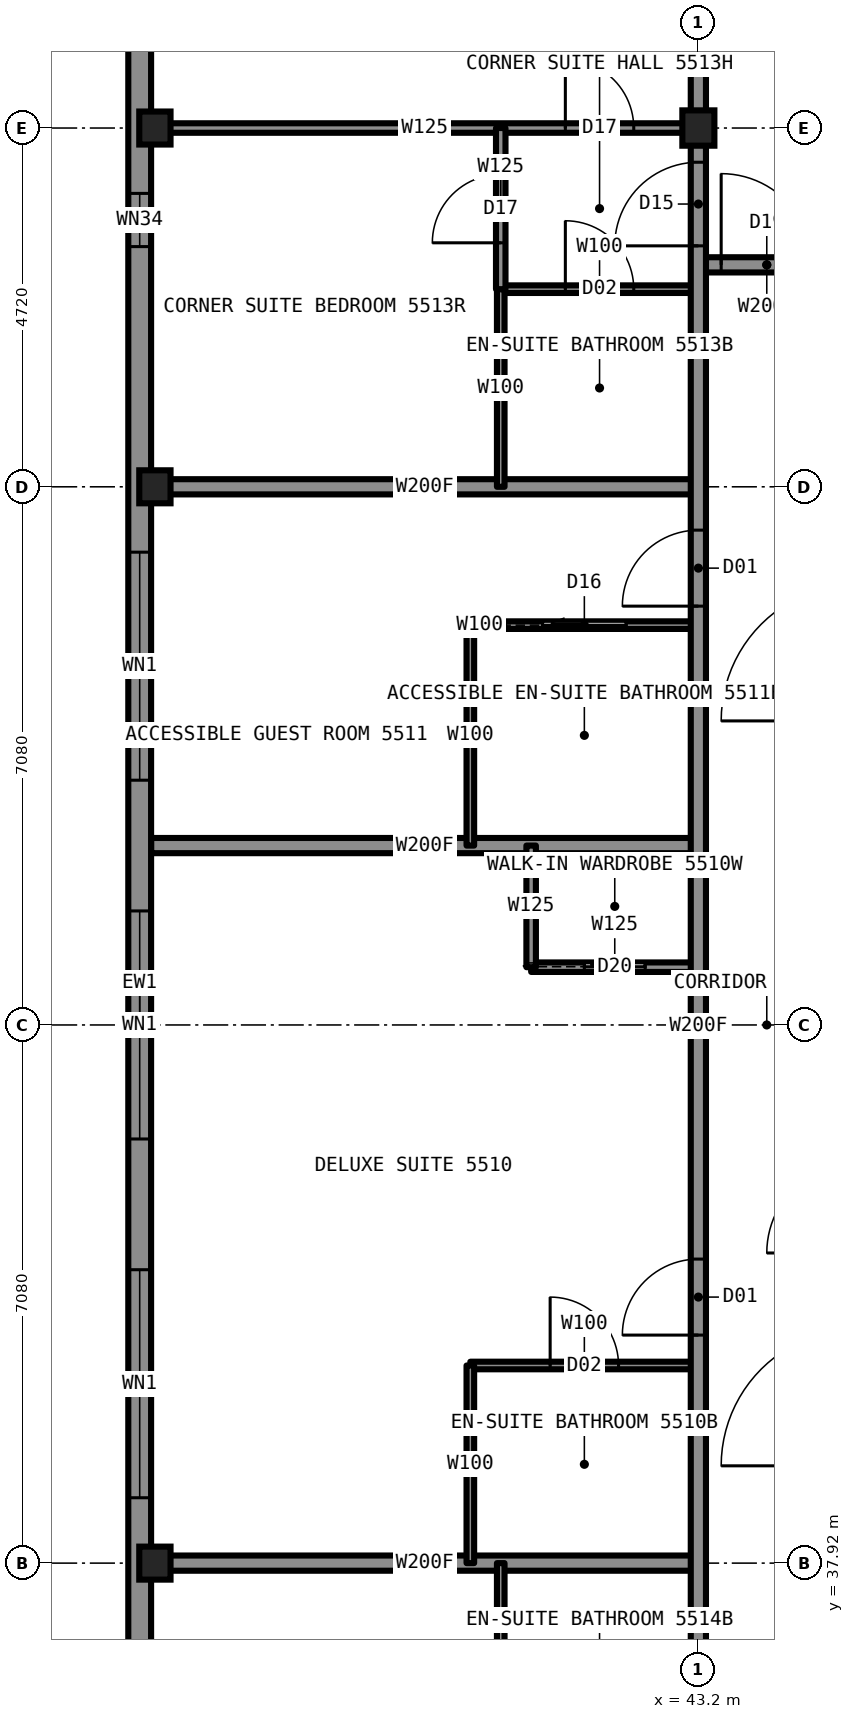
"""IFC4 building model, lengths in metres.
Left out: names, types, materials, properties, quantities, classifications, styles, units other than length and angle.
Written with IfcOpenShell. Run it as: python <this file> out.ifc"""

import sys

from ifc_helpers import new_model, si_unit, direction, frame, frame_2d, origin, origin_2d, place, context, subcontext, project, spatial, rectangle, i_section, extrude, element, fill, save


model = new_model("IFC4")
c1 = context("Model", 3, precision=1e-05, world=origin(), true_north=direction((0.0, 1.0)))
c2 = subcontext(c1, "Body", "Model", "MODEL_VIEW")
j1 = project(units=[si_unit("LENGTHUNIT", "METRE"), si_unit("PLANEANGLEUNIT", "RADIAN")], contexts=[c1])
p1 = place(None, origin())
s1 = spatial("IfcSite", under=j1, at=p1, CompositionType="ELEMENT")
p2 = place(p1, origin())
s2 = spatial("IfcBuilding", under=s1, at=p2, CompositionType="ELEMENT")
p3 = place(p2, frame((0.0, 0.0, 203.8)))
s3 = spatial("IfcBuildingStorey", under=s2, at=p3, CompositionType="ELEMENT", Elevation=203.8)
for number, where, z_axis, x_axis in (
    (1, (36.05, 37.92, 0.0), (0.0, 0.0, 1.0), (1.0, 0.0, 0.0)),
    (2, (36.05, 52.08, 0.0), (0.0, 0.0, 1.0), (1.0, 0.0, 0.0)),
    (3, (36.05, 56.8, 0.0), (0.0, 0.0, 1.0), (1.0, 0.0, 0.0)),
):
    element("IfcColumn", number, at=place(p3, frame(where, z_axis=z_axis, x_axis=x_axis)), inside=s3, PredefinedType="COLUMN", context=c2, shape_type="SweptSolid", body=[
        extrude(i_section(OverallWidth=0.411, OverallDepth=0.434, WebThickness=0.036, FlangeThickness=0.057, at=origin_2d()), origin(), (0.0, 0.0, 1.0), 3.5),
    ])
p4 = place(p3, frame((43.2, 56.8, 0.0), z_axis=(0.0, 0.0, 1.0), x_axis=(1.0, 0.0, 0.0)))
e4 = element("IfcColumn", 4, at=p4, inside=s3, PredefinedType="COLUMN", context=c2, shape_type="SweptSolid", body=[
    extrude(i_section(OverallWidth=0.422, OverallDepth=0.465, WebThickness=0.045, FlangeThickness=0.073, at=origin_2d()), origin(), (0.0, 0.0, 1.0), 3.5),
])
p5 = place(p3, frame((40.2, 40.52, 0.0), z_axis=(0.0, 0.0, 1.0), x_axis=(1.0, 0.0, 0.0)))
e5 = element("IfcWall", 5, at=p5, inside=s3, PredefinedType="PARTITIONING", context=c2, shape_type="SweptSolid", body=[
    extrude(rectangle(XDim=3.0, YDim=0.1, at=frame_2d((1.5, 0.0))), origin(), (0.0, 0.0, 1.0), 3.33),
])
p6 = place(p5, frame((1.05, 0.0, 0.0)))
e6 = element("IfcOpeningElement", 6, at=p6, cuts=e5, PredefinedType="OPENING", context=c2, shape_type="SweptSolid", body=[
    extrude(rectangle(XDim=0.9, YDim=2.1, at=frame_2d((0.45, 1.05))), frame((0.0, 0.06, 0.0), z_axis=(0.0, -1.0, 0.0), x_axis=(1.0, 0.0, 0.0)), (0.0, 0.0, 1.0), 0.12),
])
p7 = place(p3, frame((36.0, 37.92, 0.0), z_axis=(0.0, 0.0, 1.0), x_axis=(1.0, 0.0, 0.0)))
e7 = element("IfcWall", 7, at=p7, inside=s3, PredefinedType="PARTITIONING", context=c2, shape_type="SweptSolid", body=[
    extrude(rectangle(XDim=7.2, YDim=0.2, at=frame_2d((3.6, 0.0))), origin(), (0.0, 0.0, 1.0), 2.573),
])
p8 = place(p3, frame((41.0, 45.76, 0.0), z_axis=(0.0, 0.0, 1.0), x_axis=(1.0, 0.0, 0.0)))
e8 = element("IfcWall", 8, at=p8, inside=s3, PredefinedType="PARTITIONING", context=c2, shape_type="SweptSolid", body=[
    extrude(rectangle(XDim=2.2, YDim=0.125, at=frame_2d((1.1, 0.0))), origin(), (0.0, 0.0, 1.0), 3.33),
])
p9 = place(p8, frame((0.7, 0.0, 0.0)))
e9 = element("IfcOpeningElement", 9, at=p9, cuts=e8, PredefinedType="OPENING", context=c2, shape_type="SweptSolid", body=[
    extrude(rectangle(XDim=0.8, YDim=2.1, at=frame_2d((0.4, 1.05))), frame((0.0, 0.073, 0.0), z_axis=(0.0, -1.0, 0.0), x_axis=(1.0, 0.0, 0.0)), (0.0, 0.0, 1.0), 0.145),
])
p10 = place(p3, frame((43.2, 55.0, 0.0), z_axis=(0.0, 0.0, 1.0), x_axis=(1.0, 0.0, 0.0)))
e10 = element("IfcWall", 10, at=p10, inside=s3, PredefinedType="PARTITIONING", context=c2, shape_type="SweptSolid", body=[
    extrude(rectangle(XDim=1.8, YDim=0.2, at=frame_2d((0.9, 0.0))), origin(), (0.0, 0.0, 1.0), 3.33),
])
p11 = place(p10, frame((0.3, 0.0, 0.0)))
e11 = element("IfcOpeningElement", 11, at=p11, cuts=e10, PredefinedType="OPENING", context=c2, shape_type="SweptSolid", body=[
    extrude(rectangle(XDim=1.2, YDim=2.2, at=frame_2d((0.6, 1.1))), frame((0.0, 0.11, 0.0), z_axis=(0.0, -1.0, 0.0), x_axis=(1.0, 0.0, 0.0)), (0.0, 0.0, 1.0), 0.22),
])
p12 = place(p3, frame((36.0, 56.8, 0.0), z_axis=(0.0, 0.0, 1.0), x_axis=(1.0, 0.0, 0.0)))
e12 = element("IfcWall", 12, at=p12, inside=s3, PredefinedType="PARTITIONING", context=c2, shape_type="SweptSolid", body=[
    extrude(rectangle(XDim=7.2, YDim=0.125, at=frame_2d((3.6, 0.0))), origin(), (0.0, 0.0, 1.0), 2.573),
])
p13 = place(p12, frame((5.45, 0.0, 0.0)))
e13 = element("IfcOpeningElement", 13, at=p13, cuts=e12, PredefinedType="OPENING", context=c2, shape_type="SweptSolid", body=[
    extrude(rectangle(XDim=0.9, YDim=2.2, at=frame_2d((0.45, 1.1))), frame((0.0, 0.073, 0.0), z_axis=(0.0, -1.0, 0.0), x_axis=(1.0, 0.0, 0.0)), (0.0, 0.0, 1.0), 0.145),
])
p14 = place(p3, frame((36.0, 47.36, 0.0), z_axis=(0.0, 0.0, 1.0), x_axis=(1.0, 0.0, 0.0)))
e14 = element("IfcWall", 14, at=p14, inside=s3, PredefinedType="PARTITIONING", context=c2, shape_type="SweptSolid", body=[
    extrude(rectangle(XDim=7.2, YDim=0.2, at=frame_2d((3.6, 0.0))), origin(), (0.0, 0.0, 1.0), 2.73),
])
p15 = place(p3, frame((40.2, 50.26, 0.0), z_axis=(0.0, 0.0, 1.0), x_axis=(1.0, 0.0, 0.0)))
e15 = element("IfcWall", 15, at=p15, inside=s3, PredefinedType="PARTITIONING", context=c2, shape_type="SweptSolid", body=[
    extrude(rectangle(XDim=3.0, YDim=0.1, at=frame_2d((1.5, 0.0))), origin(), (0.0, 0.0, 1.0), 3.33),
])
p16 = place(p15, frame((0.95, 0.0, 0.0)))
e16 = element("IfcOpeningElement", 16, at=p16, cuts=e15, PredefinedType="OPENING", context=c2, shape_type="SweptSolid", body=[
    extrude(rectangle(XDim=1.1, YDim=2.1, at=frame_2d((0.55, 1.05))), frame((0.0, 0.06, 0.0), z_axis=(0.0, -1.0, 0.0), x_axis=(1.0, 0.0, 0.0)), (0.0, 0.0, 1.0), 0.12),
])
p17 = place(p3, frame((36.0, 52.08, 0.0), z_axis=(0.0, 0.0, 1.0), x_axis=(1.0, 0.0, 0.0)))
e17 = element("IfcWall", 17, at=p17, inside=s3, PredefinedType="PARTITIONING", context=c2, shape_type="SweptSolid", body=[
    extrude(rectangle(XDim=7.2, YDim=0.2, at=frame_2d((3.6, 0.0))), origin(), (0.0, 0.0, 1.0), 2.573),
])
p18 = place(p3, frame((40.6, 54.68, 0.0), z_axis=(0.0, 0.0, 1.0), x_axis=(1.0, 0.0, 0.0)))
e18 = element("IfcWall", 18, at=p18, inside=s3, PredefinedType="PARTITIONING", context=c2, shape_type="SweptSolid", body=[
    extrude(rectangle(XDim=2.6, YDim=0.1, at=frame_2d((1.3, 0.0))), origin(), (0.0, 0.0, 1.0), 3.33),
])
p19 = place(p18, frame((0.85, 0.0, 0.0)))
e19 = element("IfcOpeningElement", 19, at=p19, cuts=e18, PredefinedType="OPENING", context=c2, shape_type="SweptSolid", body=[
    extrude(rectangle(XDim=0.9, YDim=2.1, at=frame_2d((0.45, 1.05))), frame((0.0, 0.06, 0.0), z_axis=(0.0, -1.0, 0.0), x_axis=(1.0, 0.0, 0.0)), (0.0, 0.0, 1.0), 0.12),
])
p20 = place(p3, frame((43.2, 33.2, 0.0), z_axis=(0.0, 0.0, 1.0), x_axis=(0.0, 1.0, 0.0)))
e20 = element("IfcWall", 20, at=p20, inside=s3, PredefinedType="PARTITIONING", context=c2, shape_type="SweptSolid", body=[
    extrude(rectangle(XDim=23.58, YDim=0.2, at=frame_2d((11.79, 0.0))), origin(), (0.0, 0.0, 1.0), 3.33),
])
p21 = place(p20, frame((7.72, 0.0, 0.0)))
e21 = element("IfcOpeningElement", 21, at=p21, cuts=e20, PredefinedType="OPENING", context=c2, shape_type="SweptSolid", body=[
    extrude(rectangle(XDim=1.0, YDim=2.2, at=frame_2d((0.5, 1.1))), frame((0.0, 0.11, 0.0), z_axis=(0.0, -1.0, 0.0), x_axis=(1.0, 0.0, 0.0)), (0.0, 0.0, 1.0), 0.22),
])
p22 = place(p20, frame((17.31, 0.0, 0.0)))
e22 = element("IfcOpeningElement", 22, at=p22, cuts=e20, PredefinedType="OPENING", context=c2, shape_type="SweptSolid", body=[
    extrude(rectangle(XDim=1.0, YDim=2.2, at=frame_2d((0.5, 1.1))), frame((0.0, 0.11, 0.0), z_axis=(0.0, -1.0, 0.0), x_axis=(1.0, 0.0, 0.0)), (0.0, 0.0, 1.0), 0.22),
])
p23 = place(p20, frame((22.05, 0.0, 0.0)))
e23 = element("IfcOpeningElement", 23, at=p23, cuts=e20, PredefinedType="OPENING", context=c2, shape_type="SweptSolid", body=[
    extrude(rectangle(XDim=1.1, YDim=2.2, at=frame_2d((0.55, 1.1))), frame((0.0, 0.11, 0.0), z_axis=(0.0, -1.0, 0.0), x_axis=(1.0, 0.0, 0.0)), (0.0, 0.0, 1.0), 0.22),
])
p24 = place(p20, frame((0.66, 0.0, 0.0)))
e24 = element("IfcOpeningElement", 24, at=p24, cuts=e20, PredefinedType="OPENING", context=c2, shape_type="SweptSolid", body=[
    extrude(rectangle(XDim=1.1, YDim=2.2, at=frame_2d((0.55, 1.1))), frame((0.0, 0.11, 0.0), z_axis=(0.0, -1.0, 0.0), x_axis=(1.0, 0.0, 0.0)), (0.0, 0.0, 1.0), 0.22),
])
p25 = place(p3, frame((41.0, 45.76, 0.0), z_axis=(0.0, 0.0, 1.0), x_axis=(0.0, 1.0, 0.0)))
e25 = element("IfcWall", 25, at=p25, inside=s3, PredefinedType="PARTITIONING", context=c2, shape_type="SweptSolid", body=[
    extrude(rectangle(XDim=1.6, YDim=0.125, at=frame_2d((0.8, 0.0))), origin(), (0.0, 0.0, 1.0), 3.33),
])
for number, where, z_axis, x_axis in (
    (26, (40.6, 35.32, 0.0), (0.0, 0.0, 1.0), (0.0, 1.0, 0.0)),
    (27, (40.6, 52.08, 0.0), (0.0, 0.0, 1.0), (0.0, 1.0, 0.0)),
):
    element("IfcWall", number, at=place(p3, frame(where, z_axis=z_axis, x_axis=x_axis)), inside=s3, PredefinedType="PARTITIONING", context=c2, shape_type="SweptSolid", body=[
        extrude(rectangle(XDim=2.6, YDim=0.1, at=frame_2d((1.3, 0.0))), origin(), (0.0, 0.0, 1.0), 3.33),
    ])
p26 = place(p3, frame((40.6, 54.68, 0.0), z_axis=(0.0, 0.0, 1.0), x_axis=(0.0, 1.0, 0.0)))
e28 = element("IfcWall", 28, at=p26, inside=s3, PredefinedType="PARTITIONING", context=c2, shape_type="SweptSolid", body=[
    extrude(rectangle(XDim=2.12, YDim=0.125, at=frame_2d((1.06, 0.0))), origin(), (0.0, 0.0, 1.0), 3.33),
])
p27 = place(p26, frame((0.61, 0.0, 0.0)))
e29 = element("IfcOpeningElement", 29, at=p27, cuts=e28, PredefinedType="OPENING", context=c2, shape_type="SweptSolid", body=[
    extrude(rectangle(XDim=0.9, YDim=2.2, at=frame_2d((0.45, 1.1))), frame((0.0, 0.073, 0.0), z_axis=(0.0, -1.0, 0.0), x_axis=(1.0, 0.0, 0.0)), (0.0, 0.0, 1.0), 0.145),
])
p28 = place(p3, frame((40.2, 37.92, 0.0), z_axis=(0.0, 0.0, 1.0), x_axis=(0.0, 1.0, 0.0)))
e30 = element("IfcWall", 30, at=p28, inside=s3, PredefinedType="PARTITIONING", context=c2, shape_type="SweptSolid", body=[
    extrude(rectangle(XDim=2.6, YDim=0.1, at=frame_2d((1.3, 0.0))), origin(), (0.0, 0.0, 1.0), 3.33),
])
p29 = place(p3, frame((40.2, 47.36, 0.0), z_axis=(0.0, 0.0, 1.0), x_axis=(0.0, 1.0, 0.0)))
e31 = element("IfcWall", 31, at=p29, inside=s3, PredefinedType="PARTITIONING", context=c2, shape_type="SweptSolid", body=[
    extrude(rectangle(XDim=2.9, YDim=0.1, at=frame_2d((1.45, 0.0))), origin(), (0.0, 0.0, 1.0), 3.33),
])
p30 = place(p3, frame((35.85, 58.8, 0.0), z_axis=(0.0, 0.0, 1.0), x_axis=(0.0, -1.0, 0.0)))
e32 = element("IfcWall", 32, at=p30, inside=s3, PredefinedType="SOLIDWALL", context=c2, shape_type="SweptSolid", body=[
    extrude(rectangle(XDim=27.6, YDim=0.3, at=frame_2d((13.8, 0.0))), origin(), (0.0, 0.0, 1.0), 2.83),
])
p31 = place(p30, frame((2.86, 0.0, 0.3)))
e33 = element("IfcOpeningElement", 33, at=p31, cuts=e32, PredefinedType="OPENING", context=c2, shape_type="SweptSolid", body=[
    extrude(rectangle(XDim=0.7, YDim=1.2, at=frame_2d((0.35, 0.6))), frame((0.0, 0.16, 0.0), z_axis=(0.0, -1.0, 0.0), x_axis=(1.0, 0.0, 0.0)), (0.0, 0.0, 1.0), 0.32),
])
p32 = place(p30, frame((7.58, 0.0, 0.3)))
e34 = element("IfcOpeningElement", 34, at=p32, cuts=e32, PredefinedType="OPENING", context=c2, shape_type="SweptSolid", body=[
    extrude(rectangle(XDim=3.0, YDim=2.0, at=frame_2d((1.5, 1.0))), frame((0.0, 0.16, 0.0), z_axis=(0.0, -1.0, 0.0), x_axis=(1.0, 0.0, 0.0)), (0.0, 0.0, 1.0), 0.32),
])
p33 = place(p30, frame((12.3, 0.0, 0.3)))
e35 = element("IfcOpeningElement", 35, at=p33, cuts=e32, PredefinedType="OPENING", context=c2, shape_type="SweptSolid", body=[
    extrude(rectangle(XDim=3.0, YDim=2.0, at=frame_2d((1.5, 1.0))), frame((0.0, 0.16, 0.0), z_axis=(0.0, -1.0, 0.0), x_axis=(1.0, 0.0, 0.0)), (0.0, 0.0, 1.0), 0.32),
])
p34 = place(p30, frame((17.02, 0.0, 0.3)))
e36 = element("IfcOpeningElement", 36, at=p34, cuts=e32, PredefinedType="OPENING", context=c2, shape_type="SweptSolid", body=[
    extrude(rectangle(XDim=3.0, YDim=2.0, at=frame_2d((1.5, 1.0))), frame((0.0, 0.16, 0.0), z_axis=(0.0, -1.0, 0.0), x_axis=(1.0, 0.0, 0.0)), (0.0, 0.0, 1.0), 0.32),
])
p35 = place(p30, frame((23.99, 0.0, 0.3)))
e37 = element("IfcOpeningElement", 37, at=p35, cuts=e32, PredefinedType="OPENING", context=c2, shape_type="SweptSolid", body=[
    extrude(rectangle(XDim=0.7, YDim=1.2, at=frame_2d((0.35, 0.6))), frame((0.0, 0.16, 0.0), z_axis=(0.0, -1.0, 0.0), x_axis=(1.0, 0.0, 0.0)), (0.0, 0.0, 1.0), 0.32),
])
p36 = place(p3, frame((43.2, 56.78, 0.0), z_axis=(0.0, 0.0, 1.0), x_axis=(0.0, 1.0, 0.0)))
e38 = element("IfcWall", 38, at=p36, inside=s3, PredefinedType="PARTITIONING", context=c2, shape_type="SweptSolid", body=[
    extrude(rectangle(XDim=2.82, YDim=0.2, at=frame_2d((1.41, 0.0))), origin(), (0.0, 0.0, 1.0), 2.573),
])
p37 = place(p11, origin())
e39 = element("IfcDoor", 39, at=p37, inside=s3, OperationType="SINGLE_SWING_LEFT", PredefinedType="DOOR", context=c2, shape_type="SweptSolid", body=[
    extrude(rectangle(XDim=1.2, YDim=2.2, at=frame_2d((0.6, 1.1))), frame((0.0, 0.025, 0.0), z_axis=(0.0, -1.0, 0.0), x_axis=(1.0, 0.0, 0.0)), (0.0, 0.0, 1.0), 0.05),
])
fill(e11, e39)
p38 = place(p21, origin())
e40 = element("IfcDoor", 40, at=p38, inside=s3, OperationType="SINGLE_SWING_LEFT", PredefinedType="DOOR", context=c2, shape_type="SweptSolid", body=[
    extrude(rectangle(XDim=1.0, YDim=2.2, at=frame_2d((0.5, 1.1))), frame((0.0, 0.025, 0.0), z_axis=(0.0, -1.0, 0.0), x_axis=(1.0, 0.0, 0.0)), (0.0, 0.0, 1.0), 0.05),
])
fill(e21, e40)
p39 = place(p6, origin())
e41 = element("IfcDoor", 41, at=p39, inside=s3, OperationType="SINGLE_SWING_RIGHT", PredefinedType="DOOR", context=c2, shape_type="SweptSolid", body=[
    extrude(rectangle(XDim=0.9, YDim=2.1, at=frame_2d((0.45, 1.05))), frame((0.0, 0.025, 0.0), z_axis=(0.0, -1.0, 0.0), x_axis=(1.0, 0.0, 0.0)), (0.0, 0.0, 1.0), 0.05),
])
fill(e6, e41)
p40 = place(p9, origin())
e42 = element("IfcDoor", 42, at=p40, inside=s3, OperationType="SLIDING_TO_LEFT", PredefinedType="DOOR", context=c2, shape_type="SweptSolid", body=[
    extrude(rectangle(XDim=0.8, YDim=2.1, at=frame_2d((0.4, 1.05))), frame((0.0, 0.025, 0.0), z_axis=(0.0, -1.0, 0.0), x_axis=(1.0, 0.0, 0.0)), (0.0, 0.0, 1.0), 0.05),
])
fill(e9, e42)
p41 = place(p22, origin())
e43 = element("IfcDoor", 43, at=p41, inside=s3, OperationType="SINGLE_SWING_LEFT", PredefinedType="DOOR", context=c2, shape_type="SweptSolid", body=[
    extrude(rectangle(XDim=1.0, YDim=2.2, at=frame_2d((0.5, 1.1))), frame((0.0, 0.025, 0.0), z_axis=(0.0, -1.0, 0.0), x_axis=(1.0, 0.0, 0.0)), (0.0, 0.0, 1.0), 0.05),
])
fill(e22, e43)
p42 = place(p16, origin())
e44 = element("IfcDoor", 44, at=p42, inside=s3, OperationType="SLIDING_TO_LEFT", PredefinedType="DOOR", context=c2, shape_type="SweptSolid", body=[
    extrude(rectangle(XDim=1.1, YDim=2.1, at=frame_2d((0.55, 1.05))), frame((0.0, 0.025, 0.0), z_axis=(0.0, -1.0, 0.0), x_axis=(1.0, 0.0, 0.0)), (0.0, 0.0, 1.0), 0.05),
])
fill(e16, e44)
p43 = place(p13, origin())
e45 = element("IfcDoor", 45, at=p43, inside=s3, OperationType="SINGLE_SWING_LEFT", PredefinedType="DOOR", context=c2, shape_type="SweptSolid", body=[
    extrude(rectangle(XDim=0.9, YDim=2.2, at=frame_2d((0.45, 1.1))), frame((0.0, 0.025, 0.0), z_axis=(0.0, -1.0, 0.0), x_axis=(1.0, 0.0, 0.0)), (0.0, 0.0, 1.0), 0.05),
])
fill(e13, e45)
p44 = place(p19, origin())
e46 = element("IfcDoor", 46, at=p44, inside=s3, OperationType="SINGLE_SWING_RIGHT", PredefinedType="DOOR", context=c2, shape_type="SweptSolid", body=[
    extrude(rectangle(XDim=0.9, YDim=2.1, at=frame_2d((0.45, 1.05))), frame((0.0, 0.025, 0.0), z_axis=(0.0, -1.0, 0.0), x_axis=(1.0, 0.0, 0.0)), (0.0, 0.0, 1.0), 0.05),
])
fill(e19, e46)
p45 = place(p23, origin())
e47 = element("IfcDoor", 47, at=p45, inside=s3, OperationType="SINGLE_SWING_LEFT", PredefinedType="DOOR", context=c2, shape_type="SweptSolid", body=[
    extrude(rectangle(XDim=1.1, YDim=2.2, at=frame_2d((0.55, 1.1))), frame((0.0, 0.025, 0.0), z_axis=(0.0, -1.0, 0.0), x_axis=(1.0, 0.0, 0.0)), (0.0, 0.0, 1.0), 0.05),
])
fill(e23, e47)
p46 = place(p27, origin())
e48 = element("IfcDoor", 48, at=p46, inside=s3, OperationType="SINGLE_SWING_LEFT", PredefinedType="DOOR", context=c2, shape_type="SweptSolid", body=[
    extrude(rectangle(XDim=0.9, YDim=2.2, at=frame_2d((0.45, 1.1))), frame((0.0, 0.025, 0.0), z_axis=(0.0, -1.0, 0.0), x_axis=(1.0, 0.0, 0.0)), (0.0, 0.0, 1.0), 0.05),
])
fill(e29, e48)
p47 = place(p31, origin())
e49 = element("IfcWindow", 49, at=p47, inside=s3, PartitioningType="SINGLE_PANEL", PredefinedType="WINDOW", context=c2, shape_type="SweptSolid", body=[
    extrude(rectangle(XDim=0.7, YDim=1.2, at=frame_2d((0.35, 0.6))), frame((0.0, 0.13, 0.0), z_axis=(0.0, -1.0, 0.0), x_axis=(1.0, 0.0, 0.0)), (0.0, 0.0, 1.0), 0.06),
])
fill(e33, e49)
p48 = place(p32, origin())
e50 = element("IfcWindow", 50, at=p48, inside=s3, PartitioningType="SINGLE_PANEL", PredefinedType="WINDOW", context=c2, shape_type="SweptSolid", body=[
    extrude(rectangle(XDim=3.0, YDim=2.0, at=frame_2d((1.5, 1.0))), frame((0.0, 0.13, 0.0), z_axis=(0.0, -1.0, 0.0), x_axis=(1.0, 0.0, 0.0)), (0.0, 0.0, 1.0), 0.06),
])
fill(e34, e50)
p49 = place(p33, origin())
e51 = element("IfcWindow", 51, at=p49, inside=s3, PartitioningType="SINGLE_PANEL", PredefinedType="WINDOW", context=c2, shape_type="SweptSolid", body=[
    extrude(rectangle(XDim=3.0, YDim=2.0, at=frame_2d((1.5, 1.0))), frame((0.0, 0.13, 0.0), z_axis=(0.0, -1.0, 0.0), x_axis=(1.0, 0.0, 0.0)), (0.0, 0.0, 1.0), 0.06),
])
fill(e35, e51)
p50 = place(p34, origin())
e52 = element("IfcWindow", 52, at=p50, inside=s3, PartitioningType="SINGLE_PANEL", PredefinedType="WINDOW", context=c2, shape_type="SweptSolid", body=[
    extrude(rectangle(XDim=3.0, YDim=2.0, at=frame_2d((1.5, 1.0))), frame((0.0, 0.13, 0.0), z_axis=(0.0, -1.0, 0.0), x_axis=(1.0, 0.0, 0.0)), (0.0, 0.0, 1.0), 0.06),
])
fill(e36, e52)
save(model, sys.argv[1])
